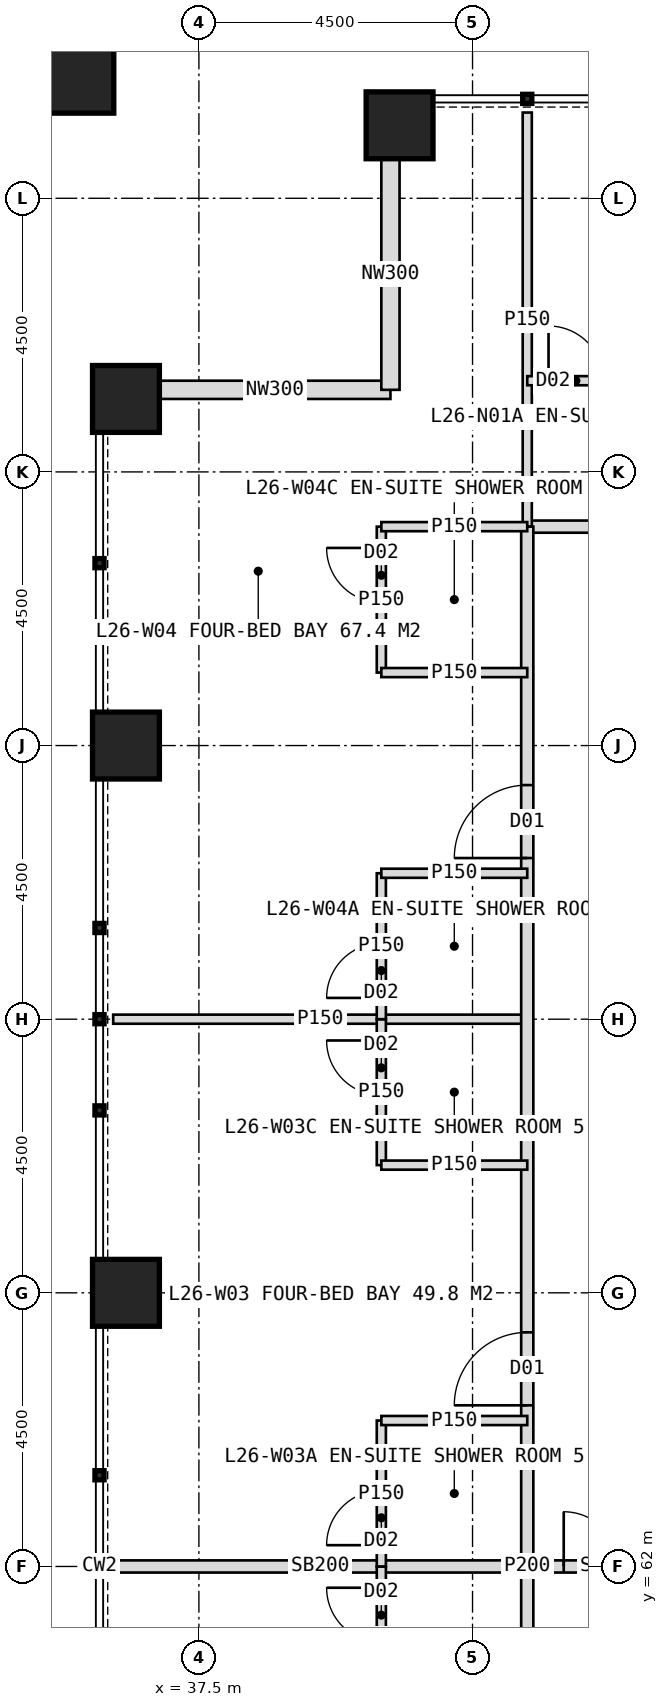
"""IFC4 building model, lengths in metres.
Left out: names, types, materials, properties, quantities, classifications, styles, units other than length and angle.
Written with IfcOpenShell. Run it as: python <this file> out.ifc"""

import sys

from ifc_helpers import new_model, si_unit, direction, frame, frame_2d, origin, origin_2d, place, context, subcontext, project, spatial, rectangle, hollow_rectangle, extrude, element, fill, save


model = new_model("IFC4")
c1 = context("Model", 3, precision=1e-05, world=origin(), true_north=direction((0.0, 1.0)))
c2 = subcontext(c1, "Body", "Model", "MODEL_VIEW")
j1 = project(units=[si_unit("LENGTHUNIT", "METRE"), si_unit("PLANEANGLEUNIT", "RADIAN")], contexts=[c1])
p1 = place(None, origin())
s1 = spatial("IfcSite", under=j1, at=p1, CompositionType="ELEMENT")
p2 = place(p1, origin())
s2 = spatial("IfcBuilding", under=s1, at=p2, CompositionType="ELEMENT")
p3 = place(p2, frame((0.0, 0.0, 112.0)))
s3 = spatial("IfcBuildingStorey", under=s2, at=p3, CompositionType="ELEMENT", Elevation=112.0)
for number, where, z_axis, x_axis in (
    (1, (40.8, 85.7, 0.0), (0.0, 0.0, 1.0), (1.0, 0.0, 0.0)),
    (2, (36.3, 66.5, 0.0), (0.0, 0.0, 1.0), (1.0, 0.0, 0.0)),
    (3, (36.3, 75.5, 0.0), (0.0, 0.0, 1.0), (1.0, 0.0, 0.0)),
    (4, (36.3, 81.2, 0.0), (0.0, 0.0, 1.0), (1.0, 0.0, 0.0)),
):
    element("IfcColumn", number, at=place(p3, frame(where, z_axis=z_axis, x_axis=x_axis)), inside=s3, PredefinedType="COLUMN", context=c2, shape_type="SweptSolid", body=[
        extrude(hollow_rectangle(XDim=1.1, YDim=1.1, WallThickness=0.1, at=origin_2d()), origin(), (0.0, 0.0, 1.0), 4.0),
    ])
p4 = place(p3, frame((35.4, 86.6, 0.0), z_axis=(0.0, 0.0, 1.0), x_axis=(1.0, 0.0, 0.0)))
e5 = element("IfcColumn", 5, at=p4, inside=s3, PredefinedType="COLUMN", context=c2, shape_type="SweptSolid", body=[
    extrude(hollow_rectangle(XDim=1.4, YDim=1.4, WallThickness=0.08, at=origin_2d()), origin(), (0.0, 0.0, 1.0), 4.0),
])
for number, where, z_axis, x_axis in (
    (6, (36.85, 81.35, 0.0), (0.0, 0.0, 1.0), (1.0, 0.0, 0.0)),
    (7, (40.65, 81.35, 0.0), (0.0, 0.0, 1.0), (0.0, 1.0, 0.0)),
):
    element("IfcWall", number, at=place(p3, frame(where, z_axis=z_axis, x_axis=x_axis)), inside=s3, PredefinedType="ELEMENTEDWALL", context=c2, shape_type="SweptSolid", body=[
        extrude(rectangle(XDim=3.8, YDim=0.3, at=frame_2d((1.9, 0.0))), origin(), (0.0, 0.0, 1.0), 4.0),
    ])
p5 = place(p3, frame((42.9, 79.1, 0.0), z_axis=(0.0, 0.0, 1.0), x_axis=(1.0, 0.0, 0.0)))
e8 = element("IfcWall", 8, at=p5, inside=s3, PredefinedType="PARTITIONING", context=c2, shape_type="SweptSolid", body=[
    extrude(rectangle(XDim=34.2, YDim=0.2, at=frame_2d((17.1, 0.0))), origin(), (0.0, 0.0, 1.0), 3.75),
])
p6 = place(p5, frame((3.25, 0.0, 0.0)))
e9 = element("IfcOpeningElement", 9, at=p6, cuts=e8, PredefinedType="OPENING", context=c2, shape_type="SweptSolid", body=[
    extrude(rectangle(XDim=1.2, YDim=2.2, at=frame_2d((0.6, 1.1))), frame((0.0, 0.11, 0.0), z_axis=(0.0, -1.0, 0.0), x_axis=(1.0, 0.0, 0.0)), (0.0, 0.0, 1.0), 0.22),
])
p7 = place(p5, frame((9.25, 0.0, 0.0)))
e10 = element("IfcOpeningElement", 10, at=p7, cuts=e8, PredefinedType="OPENING", context=c2, shape_type="SweptSolid", body=[
    extrude(rectangle(XDim=1.2, YDim=2.2, at=frame_2d((0.6, 1.1))), frame((0.0, 0.11, 0.0), z_axis=(0.0, -1.0, 0.0), x_axis=(1.0, 0.0, 0.0)), (0.0, 0.0, 1.0), 0.22),
])
p8 = place(p5, frame((13.75, 0.0, 0.0)))
e11 = element("IfcOpeningElement", 11, at=p8, cuts=e8, PredefinedType="OPENING", context=c2, shape_type="SweptSolid", body=[
    extrude(rectangle(XDim=1.2, YDim=2.2, at=frame_2d((0.6, 1.1))), frame((0.0, 0.11, 0.0), z_axis=(0.0, -1.0, 0.0), x_axis=(1.0, 0.0, 0.0)), (0.0, 0.0, 1.0), 0.22),
])
p9 = place(p5, frame((19.6, 0.0, 0.0)))
e12 = element("IfcOpeningElement", 12, at=p9, cuts=e8, PredefinedType="OPENING", context=c2, shape_type="SweptSolid", body=[
    extrude(rectangle(XDim=1.0, YDim=2.1, at=frame_2d((0.5, 1.05))), frame((0.0, 0.11, 0.0), z_axis=(0.0, -1.0, 0.0), x_axis=(1.0, 0.0, 0.0)), (0.0, 0.0, 1.0), 0.22),
])
p10 = place(p5, frame((27.25, 0.0, 0.0)))
e13 = element("IfcOpeningElement", 13, at=p10, cuts=e8, PredefinedType="OPENING", context=c2, shape_type="SweptSolid", body=[
    extrude(rectangle(XDim=1.2, YDim=2.2, at=frame_2d((0.6, 1.1))), frame((0.0, 0.11, 0.0), z_axis=(0.0, -1.0, 0.0), x_axis=(1.0, 0.0, 0.0)), (0.0, 0.0, 1.0), 0.22),
])
p11 = place(p3, frame((42.9, 79.1, 0.0), z_axis=(0.0, 0.0, 1.0), x_axis=(0.0, 1.0, 0.0)))
e14 = element("IfcWall", 14, at=p11, inside=s3, PredefinedType="PARTITIONING", context=c2, shape_type="SweptSolid", body=[
    extrude(rectangle(XDim=6.81, YDim=0.15, at=frame_2d((3.405, 0.0))), origin(), (0.0, 0.0, 1.0), 3.75),
])
p12 = place(p3, frame((42.9, 81.5, 0.0), z_axis=(0.0, 0.0, 1.0), x_axis=(1.0, 0.0, 0.0)))
e15 = element("IfcWall", 15, at=p12, inside=s3, PredefinedType="PARTITIONING", context=c2, shape_type="SweptSolid", body=[
    extrude(rectangle(XDim=3.0, YDim=0.15, at=frame_2d((1.5, 0.0))), origin(), (0.0, 0.0, 1.0), 3.75),
])
p13 = place(p12, frame((0.35, 0.0, 0.0)))
e16 = element("IfcOpeningElement", 16, at=p13, cuts=e15, PredefinedType="OPENING", context=c2, shape_type="SweptSolid", body=[
    extrude(rectangle(XDim=0.9, YDim=2.1, at=frame_2d((0.45, 1.05))), frame((0.0, 0.085, 0.0), z_axis=(0.0, -1.0, 0.0), x_axis=(1.0, 0.0, 0.0)), (0.0, 0.0, 1.0), 0.17),
])
p14 = place(p3, frame((42.9, 62.0, 0.0), z_axis=(0.0, 0.0, 1.0), x_axis=(-1.0, 0.0, 0.0)))
e17 = element("IfcWall", 17, at=p14, inside=s3, PredefinedType="SOLIDWALL", context=c2, shape_type="SweptSolid", body=[
    extrude(rectangle(XDim=6.81, YDim=0.2, at=frame_2d((3.405, 0.0))), origin(), (0.0, 0.0, 1.0), 2.95),
])
p15 = place(p3, frame((42.9, 71.0, 0.0), z_axis=(0.0, 0.0, 1.0), x_axis=(-1.0, 0.0, 0.0)))
e18 = element("IfcWall", 18, at=p15, inside=s3, PredefinedType="PARTITIONING", context=c2, shape_type="SweptSolid", body=[
    extrude(rectangle(XDim=6.81, YDim=0.15, at=frame_2d((3.405, 0.0))), origin(), (0.0, 0.0, 1.0), 3.75),
])
p16 = place(p3, frame((42.9, 44.9, 0.0), z_axis=(0.0, 0.0, 1.0), x_axis=(0.0, 1.0, 0.0)))
e19 = element("IfcWall", 19, at=p16, inside=s3, PredefinedType="PARTITIONING", context=c2, shape_type="SweptSolid", body=[
    extrude(rectangle(XDim=34.2, YDim=0.2, at=frame_2d((17.1, 0.0))), origin(), (0.0, 0.0, 1.0), 3.75),
])
p17 = place(p16, frame((3.25, 0.0, 0.0)))
e20 = element("IfcOpeningElement", 20, at=p17, cuts=e19, PredefinedType="OPENING", context=c2, shape_type="SweptSolid", body=[
    extrude(rectangle(XDim=1.2, YDim=2.2, at=frame_2d((0.6, 1.1))), frame((0.0, 0.11, 0.0), z_axis=(0.0, -1.0, 0.0), x_axis=(1.0, 0.0, 0.0)), (0.0, 0.0, 1.0), 0.22),
])
p18 = place(p16, frame((10.75, 0.0, 0.0)))
e21 = element("IfcOpeningElement", 21, at=p18, cuts=e19, PredefinedType="OPENING", context=c2, shape_type="SweptSolid", body=[
    extrude(rectangle(XDim=1.2, YDim=2.2, at=frame_2d((0.6, 1.1))), frame((0.0, 0.11, 0.0), z_axis=(0.0, -1.0, 0.0), x_axis=(1.0, 0.0, 0.0)), (0.0, 0.0, 1.0), 0.22),
])
p19 = place(p16, frame((19.75, 0.0, 0.0)))
e22 = element("IfcOpeningElement", 22, at=p19, cuts=e19, PredefinedType="OPENING", context=c2, shape_type="SweptSolid", body=[
    extrude(rectangle(XDim=1.2, YDim=2.2, at=frame_2d((0.6, 1.1))), frame((0.0, 0.11, 0.0), z_axis=(0.0, -1.0, 0.0), x_axis=(1.0, 0.0, 0.0)), (0.0, 0.0, 1.0), 0.22),
])
p20 = place(p16, frame((28.75, 0.0, 0.0)))
e23 = element("IfcOpeningElement", 23, at=p20, cuts=e19, PredefinedType="OPENING", context=c2, shape_type="SweptSolid", body=[
    extrude(rectangle(XDim=1.2, YDim=2.2, at=frame_2d((0.6, 1.1))), frame((0.0, 0.11, 0.0), z_axis=(0.0, -1.0, 0.0), x_axis=(1.0, 0.0, 0.0)), (0.0, 0.0, 1.0), 0.22),
])
p21 = place(p3, frame((40.5, 59.6, 0.0), z_axis=(0.0, 0.0, 1.0), x_axis=(0.0, 1.0, 0.0)))
e24 = element("IfcWall", 24, at=p21, inside=s3, PredefinedType="PARTITIONING", context=c2, shape_type="SweptSolid", body=[
    extrude(rectangle(XDim=2.4, YDim=0.15, at=frame_2d((1.2, 0.0))), origin(), (0.0, 0.0, 1.0), 3.75),
])
p22 = place(p21, frame((1.15, 0.0, 0.0)))
e25 = element("IfcOpeningElement", 25, at=p22, cuts=e24, PredefinedType="OPENING", context=c2, shape_type="SweptSolid", body=[
    extrude(rectangle(XDim=0.9, YDim=2.1, at=frame_2d((0.45, 1.05))), frame((0.0, 0.085, 0.0), z_axis=(0.0, -1.0, 0.0), x_axis=(1.0, 0.0, 0.0)), (0.0, 0.0, 1.0), 0.17),
])
p23 = place(p3, frame((40.5, 62.0, 0.0), z_axis=(0.0, 0.0, 1.0), x_axis=(0.0, 1.0, 0.0)))
e26 = element("IfcWall", 26, at=p23, inside=s3, PredefinedType="PARTITIONING", context=c2, shape_type="SweptSolid", body=[
    extrude(rectangle(XDim=2.4, YDim=0.15, at=frame_2d((1.2, 0.0))), origin(), (0.0, 0.0, 1.0), 3.75),
])
p24 = place(p23, frame((0.35, 0.0, 0.0)))
e27 = element("IfcOpeningElement", 27, at=p24, cuts=e26, PredefinedType="OPENING", context=c2, shape_type="SweptSolid", body=[
    extrude(rectangle(XDim=0.9, YDim=2.1, at=frame_2d((0.45, 1.05))), frame((0.0, 0.085, 0.0), z_axis=(0.0, -1.0, 0.0), x_axis=(1.0, 0.0, 0.0)), (0.0, 0.0, 1.0), 0.17),
])
p25 = place(p3, frame((42.9, 64.4, 0.0), z_axis=(0.0, 0.0, 1.0), x_axis=(-1.0, 0.0, 0.0)))
e28 = element("IfcWall", 28, at=p25, inside=s3, PredefinedType="PARTITIONING", context=c2, shape_type="SweptSolid", body=[
    extrude(rectangle(XDim=2.4, YDim=0.15, at=frame_2d((1.2, 0.0))), origin(), (0.0, 0.0, 1.0), 3.75),
])
p26 = place(p3, frame((40.5, 68.6, 0.0), z_axis=(0.0, 0.0, 1.0), x_axis=(0.0, 1.0, 0.0)))
e29 = element("IfcWall", 29, at=p26, inside=s3, PredefinedType="PARTITIONING", context=c2, shape_type="SweptSolid", body=[
    extrude(rectangle(XDim=2.4, YDim=0.15, at=frame_2d((1.2, 0.0))), origin(), (0.0, 0.0, 1.0), 3.75),
])
p27 = place(p26, frame((1.15, 0.0, 0.0)))
e30 = element("IfcOpeningElement", 30, at=p27, cuts=e29, PredefinedType="OPENING", context=c2, shape_type="SweptSolid", body=[
    extrude(rectangle(XDim=0.9, YDim=2.1, at=frame_2d((0.45, 1.05))), frame((0.0, 0.085, 0.0), z_axis=(0.0, -1.0, 0.0), x_axis=(1.0, 0.0, 0.0)), (0.0, 0.0, 1.0), 0.17),
])
p28 = place(p3, frame((42.9, 68.6, 0.0), z_axis=(0.0, 0.0, 1.0), x_axis=(-1.0, 0.0, 0.0)))
e31 = element("IfcWall", 31, at=p28, inside=s3, PredefinedType="PARTITIONING", context=c2, shape_type="SweptSolid", body=[
    extrude(rectangle(XDim=2.4, YDim=0.15, at=frame_2d((1.2, 0.0))), origin(), (0.0, 0.0, 1.0), 3.75),
])
p29 = place(p3, frame((40.5, 71.0, 0.0), z_axis=(0.0, 0.0, 1.0), x_axis=(0.0, 1.0, 0.0)))
e32 = element("IfcWall", 32, at=p29, inside=s3, PredefinedType="PARTITIONING", context=c2, shape_type="SweptSolid", body=[
    extrude(rectangle(XDim=2.4, YDim=0.15, at=frame_2d((1.2, 0.0))), origin(), (0.0, 0.0, 1.0), 3.75),
])
p30 = place(p29, frame((0.35, 0.0, 0.0)))
e33 = element("IfcOpeningElement", 33, at=p30, cuts=e32, PredefinedType="OPENING", context=c2, shape_type="SweptSolid", body=[
    extrude(rectangle(XDim=0.9, YDim=2.1, at=frame_2d((0.45, 1.05))), frame((0.0, 0.085, 0.0), z_axis=(0.0, -1.0, 0.0), x_axis=(1.0, 0.0, 0.0)), (0.0, 0.0, 1.0), 0.17),
])
p31 = place(p3, frame((42.9, 73.4, 0.0), z_axis=(0.0, 0.0, 1.0), x_axis=(-1.0, 0.0, 0.0)))
e34 = element("IfcWall", 34, at=p31, inside=s3, PredefinedType="PARTITIONING", context=c2, shape_type="SweptSolid", body=[
    extrude(rectangle(XDim=2.4, YDim=0.15, at=frame_2d((1.2, 0.0))), origin(), (0.0, 0.0, 1.0), 3.75),
])
p32 = place(p3, frame((40.5, 76.7, 0.0), z_axis=(0.0, 0.0, 1.0), x_axis=(0.0, 1.0, 0.0)))
e35 = element("IfcWall", 35, at=p32, inside=s3, PredefinedType="PARTITIONING", context=c2, shape_type="SweptSolid", body=[
    extrude(rectangle(XDim=2.4, YDim=0.15, at=frame_2d((1.2, 0.0))), origin(), (0.0, 0.0, 1.0), 3.75),
])
p33 = place(p32, frame((1.15, 0.0, 0.0)))
e36 = element("IfcOpeningElement", 36, at=p33, cuts=e35, PredefinedType="OPENING", context=c2, shape_type="SweptSolid", body=[
    extrude(rectangle(XDim=0.9, YDim=2.1, at=frame_2d((0.45, 1.05))), frame((0.0, 0.085, 0.0), z_axis=(0.0, -1.0, 0.0), x_axis=(1.0, 0.0, 0.0)), (0.0, 0.0, 1.0), 0.17),
])
for number, where, z_axis, x_axis in (
    (37, (42.9, 76.7, 0.0), (0.0, 0.0, 1.0), (-1.0, 0.0, 0.0)),
    (38, (42.9, 79.1, 0.0), (0.0, 0.0, 1.0), (-1.0, 0.0, 0.0)),
):
    element("IfcWall", number, at=place(p3, frame(where, z_axis=z_axis, x_axis=x_axis)), inside=s3, PredefinedType="PARTITIONING", context=c2, shape_type="SweptSolid", body=[
        extrude(rectangle(XDim=2.4, YDim=0.15, at=frame_2d((1.2, 0.0))), origin(), (0.0, 0.0, 1.0), 3.75),
    ])
p34 = place(p3, frame((45.6, 62.0, 0.0), z_axis=(0.0, 0.0, 1.0), x_axis=(-1.0, 0.0, 0.0)))
e39 = element("IfcWall", 39, at=p34, inside=s3, PredefinedType="SOLIDWALL", context=c2, shape_type="SweptSolid", body=[
    extrude(rectangle(XDim=2.7, YDim=0.2, at=frame_2d((1.35, 0.0))), origin(), (0.0, 0.0, 1.0), 2.95),
])
p35 = place(p34, frame((0.3, 0.0, 0.0)))
e40 = element("IfcOpeningElement", 40, at=p35, cuts=e39, PredefinedType="OPENING", context=c2, shape_type="SweptSolid", body=[
    extrude(rectangle(XDim=1.8, YDim=2.2, at=frame_2d((0.9, 1.1))), frame((0.0, 0.11, 0.0), z_axis=(0.0, -1.0, 0.0), x_axis=(1.0, 0.0, 0.0)), (0.0, 0.0, 1.0), 0.22),
])
p36 = place(p13, origin())
e41 = element("IfcDoor", 41, at=p36, inside=s3, OperationType="SINGLE_SWING_LEFT", PredefinedType="DOOR", context=c2, shape_type="SweptSolid", body=[
    extrude(rectangle(XDim=0.9, YDim=2.1, at=frame_2d((0.45, 1.05))), frame((0.0, 0.025, 0.0), z_axis=(0.0, -1.0, 0.0), x_axis=(1.0, 0.0, 0.0)), (0.0, 0.0, 1.0), 0.05),
])
fill(e16, e41)
p37 = place(p22, origin())
e42 = element("IfcDoor", 42, at=p37, inside=s3, OperationType="SINGLE_SWING_RIGHT", PredefinedType="DOOR", context=c2, shape_type="SweptSolid", body=[
    extrude(rectangle(XDim=0.9, YDim=2.1, at=frame_2d((0.45, 1.05))), frame((0.0, 0.025, 0.0), z_axis=(0.0, -1.0, 0.0), x_axis=(1.0, 0.0, 0.0)), (0.0, 0.0, 1.0), 0.05),
])
fill(e25, e42)
p38 = place(p19, origin())
e43 = element("IfcDoor", 43, at=p38, inside=s3, OperationType="SINGLE_SWING_LEFT", PredefinedType="DOOR", context=c2, shape_type="SweptSolid", body=[
    extrude(rectangle(XDim=1.2, YDim=2.2, at=frame_2d((0.6, 1.1))), frame((0.0, 0.025, 0.0), z_axis=(0.0, -1.0, 0.0), x_axis=(1.0, 0.0, 0.0)), (0.0, 0.0, 1.0), 0.05),
])
fill(e22, e43)
p39 = place(p24, origin())
e44 = element("IfcDoor", 44, at=p39, inside=s3, OperationType="SINGLE_SWING_LEFT", PredefinedType="DOOR", context=c2, shape_type="SweptSolid", body=[
    extrude(rectangle(XDim=0.9, YDim=2.1, at=frame_2d((0.45, 1.05))), frame((0.0, 0.025, 0.0), z_axis=(0.0, -1.0, 0.0), x_axis=(1.0, 0.0, 0.0)), (0.0, 0.0, 1.0), 0.05),
])
fill(e27, e44)
p40 = place(p27, origin())
e45 = element("IfcDoor", 45, at=p40, inside=s3, OperationType="SINGLE_SWING_RIGHT", PredefinedType="DOOR", context=c2, shape_type="SweptSolid", body=[
    extrude(rectangle(XDim=0.9, YDim=2.1, at=frame_2d((0.45, 1.05))), frame((0.0, 0.025, 0.0), z_axis=(0.0, -1.0, 0.0), x_axis=(1.0, 0.0, 0.0)), (0.0, 0.0, 1.0), 0.05),
])
fill(e30, e45)
p41 = place(p20, origin())
e46 = element("IfcDoor", 46, at=p41, inside=s3, OperationType="SINGLE_SWING_LEFT", PredefinedType="DOOR", context=c2, shape_type="SweptSolid", body=[
    extrude(rectangle(XDim=1.2, YDim=2.2, at=frame_2d((0.6, 1.1))), frame((0.0, 0.025, 0.0), z_axis=(0.0, -1.0, 0.0), x_axis=(1.0, 0.0, 0.0)), (0.0, 0.0, 1.0), 0.05),
])
fill(e23, e46)
p42 = place(p30, origin())
e47 = element("IfcDoor", 47, at=p42, inside=s3, OperationType="SINGLE_SWING_LEFT", PredefinedType="DOOR", context=c2, shape_type="SweptSolid", body=[
    extrude(rectangle(XDim=0.9, YDim=2.1, at=frame_2d((0.45, 1.05))), frame((0.0, 0.025, 0.0), z_axis=(0.0, -1.0, 0.0), x_axis=(1.0, 0.0, 0.0)), (0.0, 0.0, 1.0), 0.05),
])
fill(e33, e47)
p43 = place(p33, origin())
e48 = element("IfcDoor", 48, at=p43, inside=s3, OperationType="SINGLE_SWING_RIGHT", PredefinedType="DOOR", context=c2, shape_type="SweptSolid", body=[
    extrude(rectangle(XDim=0.9, YDim=2.1, at=frame_2d((0.45, 1.05))), frame((0.0, 0.025, 0.0), z_axis=(0.0, -1.0, 0.0), x_axis=(1.0, 0.0, 0.0)), (0.0, 0.0, 1.0), 0.05),
])
fill(e36, e48)
p44 = place(p35, origin())
e49 = element("IfcDoor", 49, at=p44, inside=s3, OperationType="DOUBLE_DOOR_DOUBLE_SWING", PredefinedType="DOOR", context=c2, shape_type="SweptSolid", body=[
    extrude(rectangle(XDim=1.8, YDim=2.2, at=frame_2d((0.9, 1.1))), frame((0.0, 0.025, 0.0), z_axis=(0.0, -1.0, 0.0), x_axis=(1.0, 0.0, 0.0)), (0.0, 0.0, 1.0), 0.05),
])
fill(e40, e49)
save(model, sys.argv[1])
